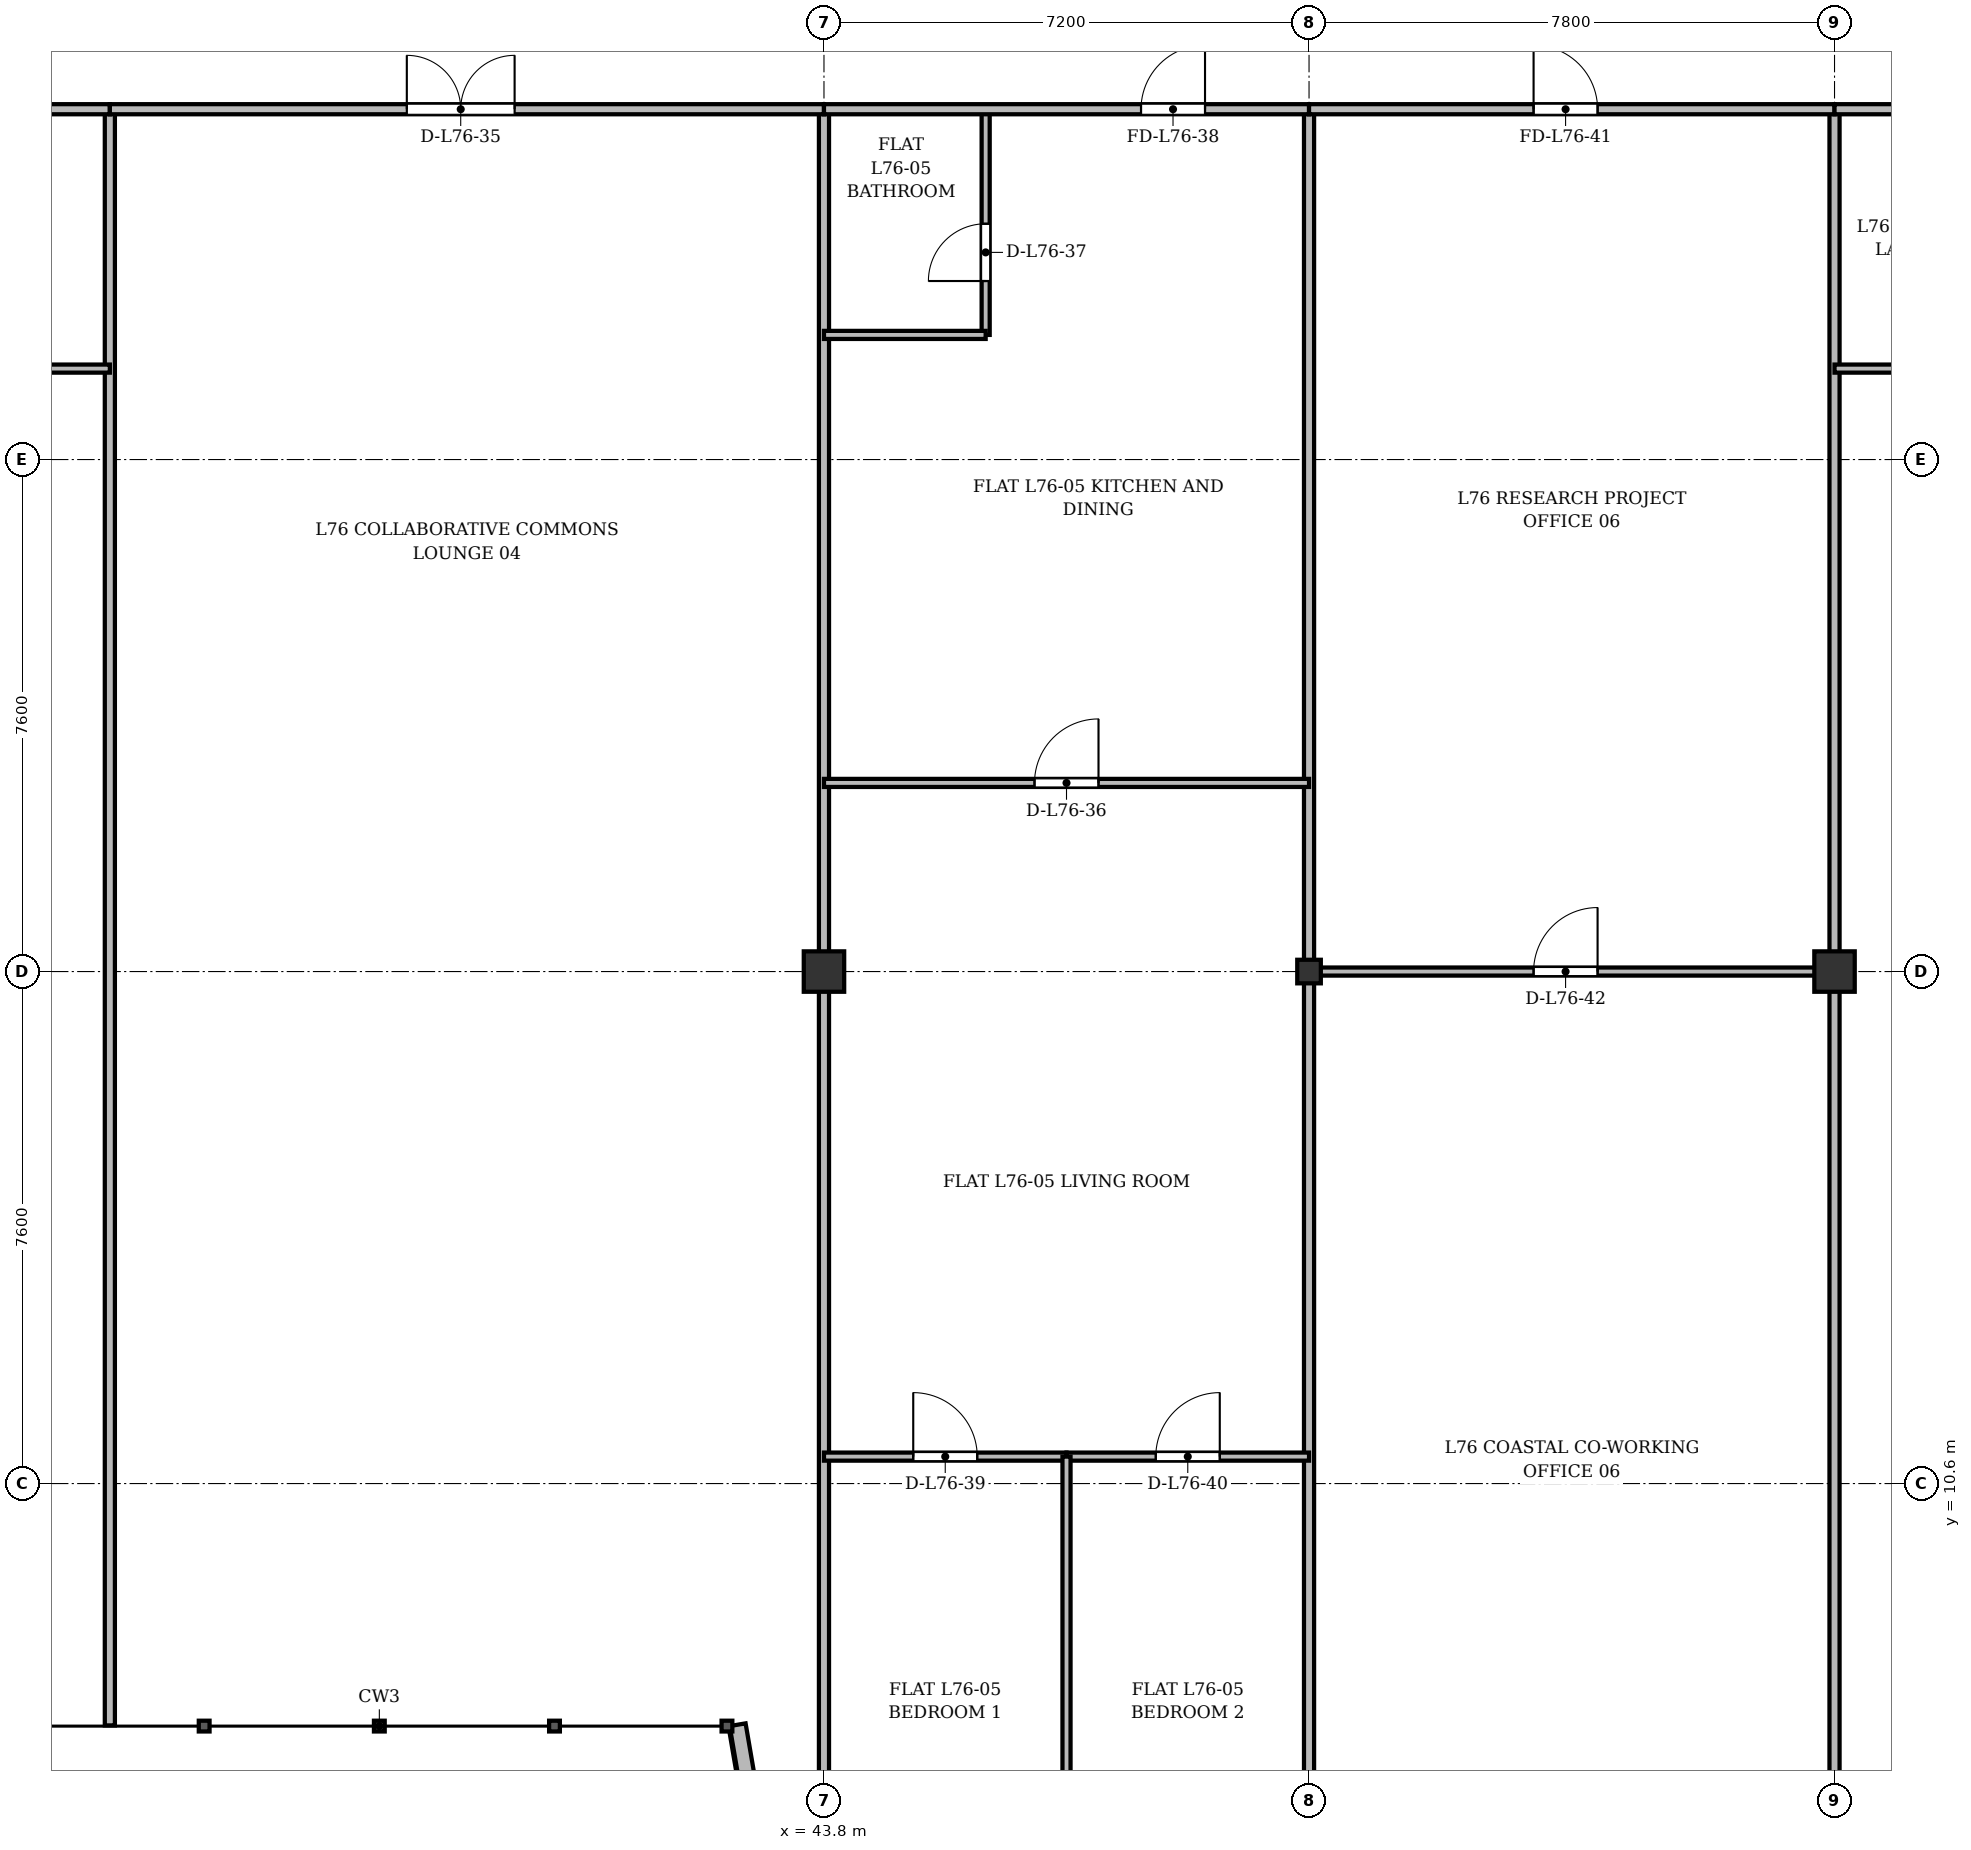
"""IFC4 building model, lengths in metres.
Left out: names, types, materials, properties, quantities, classifications, styles, units other than length and angle.
Written with IfcOpenShell. Run it as: python <this file> out.ifc"""

import sys

from ifc_helpers import new_model, si_unit, direction, frame, frame_2d, origin, origin_2d, place, context, subcontext, project, spatial, rectangle, i_section, extrude, source, transform, mapped, element, fill, save


model = new_model("IFC4")
c1 = context("Model", 3, precision=1e-05, world=origin(), true_north=direction((0.0, 1.0)))
c2 = subcontext(c1, "Body", "Model", "MODEL_VIEW")
j1 = project(units=[si_unit("LENGTHUNIT", "METRE"), si_unit("PLANEANGLEUNIT", "RADIAN")], contexts=[c1])
p1 = place(None, origin())
s1 = spatial("IfcSite", under=j1, at=p1, CompositionType="ELEMENT")
p2 = place(p1, origin())
s2 = spatial("IfcBuilding", under=s1, at=p2, CompositionType="ELEMENT")
p3 = place(p2, frame((0.0, 0.0, 291.9)))
s3 = spatial("IfcBuildingStorey", under=s2, at=p3, CompositionType="ELEMENT", Elevation=291.9)
m1 = source(origin(), c2, "Body", "SweptSolid", [
    extrude(rectangle(XDim=0.6, YDim=0.6, at=origin_2d()), origin(), (0.0, 0.0, 1.0), 3.6),
])
p4 = place(p3, frame((43.8, 18.2, 0.0), z_axis=(0.0, 0.0, 1.0), x_axis=(1.0, 0.0, 0.0)))
e1 = element("IfcColumn", 1, at=p4, inside=s3, PredefinedType="COLUMN", context=c2, shape_type="MappedRepresentation", body=[
    mapped(m1, transform((0.0, 0.0, 0.0), x_axis=(1.0, 0.0, 0.0), y_axis=(0.0, 1.0, 0.0), z_axis=(0.0, 0.0, 1.0), scale=1.0)),
])
m2 = source(origin(), c2, "Body", "SweptSolid", [
    extrude(i_section(OverallWidth=0.35, OverallDepth=0.35, WebThickness=0.018, FlangeThickness=0.028, at=origin_2d()), origin(), (0.0, 0.0, 1.0), 3.6),
])
p5 = place(p3, frame((51.0, 18.2, 0.0), z_axis=(0.0, 0.0, 1.0), x_axis=(1.0, 0.0, 0.0)))
e2 = element("IfcColumn", 2, at=p5, inside=s3, PredefinedType="COLUMN", context=c2, shape_type="MappedRepresentation", body=[
    mapped(m2, transform((0.0, 0.0, 0.0), x_axis=(1.0, 0.0, 0.0), y_axis=(0.0, 1.0, 0.0), z_axis=(0.0, 0.0, 1.0), scale=1.0)),
])
p6 = place(p3, frame((58.8, 18.2, 0.0), z_axis=(0.0, 0.0, 1.0), x_axis=(1.0, 0.0, 0.0)))
e3 = element("IfcColumn", 3, at=p6, inside=s3, PredefinedType="COLUMN", context=c2, shape_type="MappedRepresentation", body=[
    mapped(m1, transform((0.0, 0.0, 0.0), x_axis=(1.0, 0.0, 0.0), y_axis=(0.0, 1.0, 0.0), z_axis=(0.0, 0.0, 1.0), scale=1.0)),
])
p7 = place(p3, frame((43.118, 3.52, 0.0), z_axis=(0.0, 0.0, 1.0), x_axis=(-0.168990530437, 0.98561767467, 0.0)))
e4 = element("IfcWall", 4, at=p7, inside=s3, PredefinedType="SOLIDWALL", context=c2, shape_type="SweptSolid", body=[
    extrude(rectangle(XDim=3.551, YDim=0.24, at=frame_2d((1.775, 0.0))), origin(), (0.0, 0.0, 1.0), 2.73),
])
p8 = place(p3, frame((33.2, 7.01, 0.0), z_axis=(0.0, 0.0, 1.0), x_axis=(0.0, 1.0, 0.0)))
e5 = element("IfcWall", 5, at=p8, inside=s3, PredefinedType="PARTITIONING", context=c2, shape_type="SweptSolid", body=[
    extrude(rectangle(XDim=23.99, YDim=0.15, at=frame_2d((11.995, 0.0))), origin(), (0.0, 0.0, 1.0), 2.73),
])
for number, where, z_axis, x_axis in (
    (6, (43.8, 3.725, 0.0), (0.0, 0.0, 1.0), (0.0, 1.0, 0.0)),
    (7, (51.0, 3.725, 0.0), (0.0, 0.0, 1.0), (0.0, 1.0, 0.0)),
):
    element("IfcWall", number, at=place(p3, frame(where, z_axis=z_axis, x_axis=x_axis)), inside=s3, PredefinedType="PARTITIONING", context=c2, shape_type="SweptSolid", body=[
        extrude(rectangle(XDim=27.275, YDim=0.15, at=frame_2d((13.637, 0.0))), origin(), (0.0, 0.0, 1.0), 2.68),
    ])
p9 = place(p3, frame((58.8, 3.725, 0.0), z_axis=(0.0, 0.0, 1.0), x_axis=(0.0, 1.0, 0.0)))
e8 = element("IfcWall", 8, at=p9, inside=s3, PredefinedType="PARTITIONING", context=c2, shape_type="SweptSolid", body=[
    extrude(rectangle(XDim=27.275, YDim=0.15, at=frame_2d((13.637, 0.0))), origin(), (0.0, 0.0, 1.0), 2.53),
])
p10 = place(p3, frame((23.4, 31.0, 0.0), z_axis=(0.0, 0.0, 1.0), x_axis=(1.0, 0.0, 0.0)))
e9 = element("IfcWall", 9, at=p10, inside=s3, PredefinedType="PARTITIONING", context=c2, shape_type="SweptSolid", body=[
    extrude(rectangle(XDim=9.8, YDim=0.15, at=frame_2d((4.9, 0.0))), origin(), (0.0, 0.0, 1.0), 2.68),
])
p11 = place(p10, frame((4.425, 0.0, 0.0)))
e10 = element("IfcOpeningElement", 10, at=p11, cuts=e9, PredefinedType="OPENING", context=c2, shape_type="SweptSolid", body=[
    extrude(rectangle(XDim=0.95, YDim=2.15, at=frame_2d((0.475, 1.075))), frame((0.0, 0.085, 0.0), z_axis=(0.0, -1.0, 0.0), x_axis=(1.0, 0.0, 0.0)), (0.0, 0.0, 1.0), 0.17),
])
p12 = place(p3, frame((23.4, 27.15, 0.0), z_axis=(0.0, 0.0, 1.0), x_axis=(1.0, 0.0, 0.0)))
e11 = element("IfcWall", 11, at=p12, inside=s3, PredefinedType="PARTITIONING", context=c2, shape_type="SweptSolid", body=[
    extrude(rectangle(XDim=9.8, YDim=0.12, at=frame_2d((4.9, 0.0))), origin(), (0.0, 0.0, 1.0), 2.68),
])
p13 = place(p12, frame((4.425, 0.0, 0.0)))
e12 = element("IfcOpeningElement", 12, at=p13, cuts=e11, PredefinedType="OPENING", context=c2, shape_type="SweptSolid", body=[
    extrude(rectangle(XDim=0.95, YDim=2.15, at=frame_2d((0.475, 1.075))), frame((0.0, 0.07, 0.0), z_axis=(0.0, -1.0, 0.0), x_axis=(1.0, 0.0, 0.0)), (0.0, 0.0, 1.0), 0.14),
])
p14 = place(p3, frame((33.2, 31.0, 0.0), z_axis=(0.0, 0.0, 1.0), x_axis=(1.0, 0.0, 0.0)))
e13 = element("IfcWall", 13, at=p14, inside=s3, PredefinedType="PARTITIONING", context=c2, shape_type="SweptSolid", body=[
    extrude(rectangle(XDim=10.6, YDim=0.15, at=frame_2d((5.3, 0.0))), origin(), (0.0, 0.0, 1.0), 2.68),
])
p15 = place(p14, frame((4.408, 0.0, 0.0)))
e14 = element("IfcOpeningElement", 14, at=p15, cuts=e13, PredefinedType="OPENING", context=c2, shape_type="SweptSolid", body=[
    extrude(rectangle(XDim=1.6, YDim=2.2, at=frame_2d((0.8, 1.1))), frame((0.0, 0.085, 0.0), z_axis=(0.0, -1.0, 0.0), x_axis=(1.0, 0.0, 0.0)), (0.0, 0.0, 1.0), 0.17),
])
p16 = place(p3, frame((43.8, 21.0, 0.0), z_axis=(0.0, 0.0, 1.0), x_axis=(1.0, 0.0, 0.0)))
e15 = element("IfcWall", 15, at=p16, inside=s3, PredefinedType="PARTITIONING", context=c2, shape_type="SweptSolid", body=[
    extrude(rectangle(XDim=7.2, YDim=0.12, at=frame_2d((3.6, 0.0))), origin(), (0.0, 0.0, 1.0), 2.68),
])
p17 = place(p16, frame((3.125, 0.0, 0.0)))
e16 = element("IfcOpeningElement", 16, at=p17, cuts=e15, PredefinedType="OPENING", context=c2, shape_type="SweptSolid", body=[
    extrude(rectangle(XDim=0.95, YDim=2.15, at=frame_2d((0.475, 1.075))), frame((0.0, 0.07, 0.0), z_axis=(0.0, -1.0, 0.0), x_axis=(1.0, 0.0, 0.0)), (0.0, 0.0, 1.0), 0.14),
])
p18 = place(p3, frame((46.2, 27.65, 0.0), z_axis=(0.0, 0.0, 1.0), x_axis=(0.0, 1.0, 0.0)))
e17 = element("IfcWall", 17, at=p18, inside=s3, PredefinedType="PARTITIONING", context=c2, shape_type="SweptSolid", body=[
    extrude(rectangle(XDim=3.35, YDim=0.12, at=frame_2d((1.675, 0.0))), origin(), (0.0, 0.0, 1.0), 3.18),
])
p19 = place(p18, frame((0.8, 0.0, 0.0)))
e18 = element("IfcOpeningElement", 18, at=p19, cuts=e17, PredefinedType="OPENING", context=c2, shape_type="SweptSolid", body=[
    extrude(rectangle(XDim=0.85, YDim=2.1, at=frame_2d((0.425, 1.05))), frame((0.0, 0.07, 0.0), z_axis=(0.0, -1.0, 0.0), x_axis=(1.0, 0.0, 0.0)), (0.0, 0.0, 1.0), 0.14),
])
p20 = place(p3, frame((43.8, 27.65, 0.0), z_axis=(0.0, 0.0, 1.0), x_axis=(1.0, 0.0, 0.0)))
e19 = element("IfcWall", 19, at=p20, inside=s3, PredefinedType="PARTITIONING", context=c2, shape_type="SweptSolid", body=[
    extrude(rectangle(XDim=2.4, YDim=0.12, at=frame_2d((1.2, 0.0))), origin(), (0.0, 0.0, 1.0), 2.68),
])
p21 = place(p3, frame((43.8, 31.0, 0.0), z_axis=(0.0, 0.0, 1.0), x_axis=(1.0, 0.0, 0.0)))
e20 = element("IfcWall", 20, at=p21, inside=s3, PredefinedType="PARTITIONING", context=c2, shape_type="SweptSolid", body=[
    extrude(rectangle(XDim=7.2, YDim=0.15, at=frame_2d((3.6, 0.0))), origin(), (0.0, 0.0, 1.0), 2.68),
])
p22 = place(p21, frame((4.706, 0.0, 0.0)))
e21 = element("IfcOpeningElement", 21, at=p22, cuts=e20, PredefinedType="OPENING", context=c2, shape_type="SweptSolid", body=[
    extrude(rectangle(XDim=0.95, YDim=2.15, at=frame_2d((0.475, 1.075))), frame((0.0, 0.085, 0.0), z_axis=(0.0, -1.0, 0.0), x_axis=(1.0, 0.0, 0.0)), (0.0, 0.0, 1.0), 0.17),
])
p23 = place(p3, frame((43.8, 11.0, 0.0), z_axis=(0.0, 0.0, 1.0), x_axis=(1.0, 0.0, 0.0)))
e22 = element("IfcWall", 22, at=p23, inside=s3, PredefinedType="PARTITIONING", context=c2, shape_type="SweptSolid", body=[
    extrude(rectangle(XDim=3.6, YDim=0.12, at=frame_2d((1.8, 0.0))), origin(), (0.0, 0.0, 1.0), 2.68),
])
p24 = place(p23, frame((1.325, 0.0, 0.0)))
e23 = element("IfcOpeningElement", 23, at=p24, cuts=e22, PredefinedType="OPENING", context=c2, shape_type="SweptSolid", body=[
    extrude(rectangle(XDim=0.95, YDim=2.15, at=frame_2d((0.475, 1.075))), frame((0.0, 0.07, 0.0), z_axis=(0.0, -1.0, 0.0), x_axis=(1.0, 0.0, 0.0)), (0.0, 0.0, 1.0), 0.14),
])
p25 = place(p3, frame((47.4, 11.0, 0.0), z_axis=(0.0, 0.0, 1.0), x_axis=(1.0, 0.0, 0.0)))
e24 = element("IfcWall", 24, at=p25, inside=s3, PredefinedType="PARTITIONING", context=c2, shape_type="SweptSolid", body=[
    extrude(rectangle(XDim=3.6, YDim=0.12, at=frame_2d((1.8, 0.0))), origin(), (0.0, 0.0, 1.0), 2.68),
])
p26 = place(p25, frame((1.325, 0.0, 0.0)))
e25 = element("IfcOpeningElement", 25, at=p26, cuts=e24, PredefinedType="OPENING", context=c2, shape_type="SweptSolid", body=[
    extrude(rectangle(XDim=0.95, YDim=2.15, at=frame_2d((0.475, 1.075))), frame((0.0, 0.07, 0.0), z_axis=(0.0, -1.0, 0.0), x_axis=(1.0, 0.0, 0.0)), (0.0, 0.0, 1.0), 0.14),
])
p27 = place(p3, frame((47.4, 3.725, 0.0), z_axis=(0.0, 0.0, 1.0), x_axis=(0.0, 1.0, 0.0)))
e26 = element("IfcWall", 26, at=p27, inside=s3, PredefinedType="PARTITIONING", context=c2, shape_type="SweptSolid", body=[
    extrude(rectangle(XDim=7.275, YDim=0.12, at=frame_2d((3.637, 0.0))), origin(), (0.0, 0.0, 1.0), 2.73),
])
p28 = place(p3, frame((51.0, 31.0, 0.0), z_axis=(0.0, 0.0, 1.0), x_axis=(1.0, 0.0, 0.0)))
e27 = element("IfcWall", 27, at=p28, inside=s3, PredefinedType="PARTITIONING", context=c2, shape_type="SweptSolid", body=[
    extrude(rectangle(XDim=7.8, YDim=0.15, at=frame_2d((3.9, 0.0))), origin(), (0.0, 0.0, 1.0), 2.68),
])
p29 = place(p28, frame((3.333, 0.0, 0.0)))
e28 = element("IfcOpeningElement", 28, at=p29, cuts=e27, PredefinedType="OPENING", context=c2, shape_type="SweptSolid", body=[
    extrude(rectangle(XDim=0.95, YDim=2.15, at=frame_2d((0.475, 1.075))), frame((0.0, 0.085, 0.0), z_axis=(0.0, -1.0, 0.0), x_axis=(1.0, 0.0, 0.0)), (0.0, 0.0, 1.0), 0.17),
])
p30 = place(p3, frame((51.0, 18.2, 0.0), z_axis=(0.0, 0.0, 1.0), x_axis=(1.0, 0.0, 0.0)))
e29 = element("IfcWall", 29, at=p30, inside=s3, PredefinedType="PARTITIONING", context=c2, shape_type="SweptSolid", body=[
    extrude(rectangle(XDim=7.8, YDim=0.12, at=frame_2d((3.9, 0.0))), origin(), (0.0, 0.0, 1.0), 2.73),
])
p31 = place(p30, frame((3.333, 0.0, 0.0)))
e30 = element("IfcOpeningElement", 30, at=p31, cuts=e29, PredefinedType="OPENING", context=c2, shape_type="SweptSolid", body=[
    extrude(rectangle(XDim=0.95, YDim=2.15, at=frame_2d((0.475, 1.075))), frame((0.0, 0.07, 0.0), z_axis=(0.0, -1.0, 0.0), x_axis=(1.0, 0.0, 0.0)), (0.0, 0.0, 1.0), 0.14),
])
p32 = place(p3, frame((58.8, 31.0, 0.0), z_axis=(0.0, 0.0, 1.0), x_axis=(1.0, 0.0, 0.0)))
e31 = element("IfcWall", 31, at=p32, inside=s3, PredefinedType="PARTITIONING", context=c2, shape_type="SweptSolid", body=[
    extrude(rectangle(XDim=7.175, YDim=0.15, at=frame_2d((3.587, 0.0))), origin(), (0.0, 0.0, 1.0), 2.53),
])
p33 = place(p32, frame((3.112, 0.0, 0.0)))
e32 = element("IfcOpeningElement", 32, at=p33, cuts=e31, PredefinedType="OPENING", context=c2, shape_type="SweptSolid", body=[
    extrude(rectangle(XDim=0.95, YDim=2.15, at=frame_2d((0.475, 1.075))), frame((0.0, 0.085, 0.0), z_axis=(0.0, -1.0, 0.0), x_axis=(1.0, 0.0, 0.0)), (0.0, 0.0, 1.0), 0.17),
])
p34 = place(p3, frame((58.8, 27.15, 0.0), z_axis=(0.0, 0.0, 1.0), x_axis=(1.0, 0.0, 0.0)))
e33 = element("IfcWall", 33, at=p34, inside=s3, PredefinedType="PARTITIONING", context=c2, shape_type="SweptSolid", body=[
    extrude(rectangle(XDim=7.175, YDim=0.12, at=frame_2d((3.587, 0.0))), origin(), (0.0, 0.0, 1.0), 2.53),
])
p35 = place(p34, frame((3.112, 0.0, 0.0)))
e34 = element("IfcOpeningElement", 34, at=p35, cuts=e33, PredefinedType="OPENING", context=c2, shape_type="SweptSolid", body=[
    extrude(rectangle(XDim=0.95, YDim=2.15, at=frame_2d((0.475, 1.075))), frame((0.0, 0.07, 0.0), z_axis=(0.0, -1.0, 0.0), x_axis=(1.0, 0.0, 0.0)), (0.0, 0.0, 1.0), 0.14),
])
m3 = source(origin(), c2, "Body", "SweptSolid", [
    extrude(rectangle(XDim=1.6, YDim=2.2, at=frame_2d((0.8, 1.1))), frame((0.0, 0.025, 0.0), z_axis=(0.0, -1.0, 0.0), x_axis=(1.0, 0.0, 0.0)), (0.0, 0.0, 1.0), 0.05),
])
p36 = place(p15, origin())
e35 = element("IfcDoor", 35, at=p36, inside=s3, OperationType="DOUBLE_DOOR_SINGLE_SWING", PredefinedType="DOOR", context=c2, shape_type="MappedRepresentation", body=[
    mapped(m3, transform((0.0, 0.0, 0.0), x_axis=(1.0, 0.0, 0.0), y_axis=(0.0, 1.0, 0.0), z_axis=(0.0, 0.0, 1.0), scale=1.0)),
])
fill(e14, e35)
m4 = source(origin(), c2, "Body", "SweptSolid", [
    extrude(rectangle(XDim=0.95, YDim=2.15, at=frame_2d((0.475, 1.075))), frame((0.0, 0.025, 0.0), z_axis=(0.0, -1.0, 0.0), x_axis=(1.0, 0.0, 0.0)), (0.0, 0.0, 1.0), 0.05),
])
p37 = place(p17, origin())
e36 = element("IfcDoor", 36, at=p37, inside=s3, OperationType="SINGLE_SWING_RIGHT", PredefinedType="DOOR", context=c2, shape_type="MappedRepresentation", body=[
    mapped(m4, transform((0.0, 0.0, 0.0), x_axis=(1.0, 0.0, 0.0), y_axis=(0.0, 1.0, 0.0), z_axis=(0.0, 0.0, 1.0), scale=1.0)),
])
fill(e16, e36)
m5 = source(origin(), c2, "Body", "SweptSolid", [
    extrude(rectangle(XDim=0.85, YDim=2.1, at=frame_2d((0.425, 1.05))), frame((0.0, 0.025, 0.0), z_axis=(0.0, -1.0, 0.0), x_axis=(1.0, 0.0, 0.0)), (0.0, 0.0, 1.0), 0.05),
])
p38 = place(p19, origin())
e37 = element("IfcDoor", 37, at=p38, inside=s3, OperationType="SINGLE_SWING_LEFT", PredefinedType="DOOR", context=c2, shape_type="MappedRepresentation", body=[
    mapped(m5, transform((0.0, 0.0, 0.0), x_axis=(1.0, 0.0, 0.0), y_axis=(0.0, 1.0, 0.0), z_axis=(0.0, 0.0, 1.0), scale=1.0)),
])
fill(e18, e37)
p39 = place(p22, origin())
e38 = element("IfcDoor", 38, at=p39, inside=s3, OperationType="SINGLE_SWING_RIGHT", PredefinedType="DOOR", context=c2, shape_type="MappedRepresentation", body=[
    mapped(m4, transform((0.0, 0.0, 0.0), x_axis=(1.0, 0.0, 0.0), y_axis=(0.0, 1.0, 0.0), z_axis=(0.0, 0.0, 1.0), scale=1.0)),
])
fill(e21, e38)
p40 = place(p24, origin())
e39 = element("IfcDoor", 39, at=p40, inside=s3, OperationType="SINGLE_SWING_LEFT", PredefinedType="DOOR", context=c2, shape_type="MappedRepresentation", body=[
    mapped(m4, transform((0.0, 0.0, 0.0), x_axis=(1.0, 0.0, 0.0), y_axis=(0.0, 1.0, 0.0), z_axis=(0.0, 0.0, 1.0), scale=1.0)),
])
fill(e23, e39)
p41 = place(p26, origin())
e40 = element("IfcDoor", 40, at=p41, inside=s3, OperationType="SINGLE_SWING_RIGHT", PredefinedType="DOOR", context=c2, shape_type="MappedRepresentation", body=[
    mapped(m4, transform((0.0, 0.0, 0.0), x_axis=(1.0, 0.0, 0.0), y_axis=(0.0, 1.0, 0.0), z_axis=(0.0, 0.0, 1.0), scale=1.0)),
])
fill(e25, e40)
p42 = place(p29, origin())
e41 = element("IfcDoor", 41, at=p42, inside=s3, OperationType="SINGLE_SWING_LEFT", PredefinedType="DOOR", context=c2, shape_type="MappedRepresentation", body=[
    mapped(m4, transform((0.0, 0.0, 0.0), x_axis=(1.0, 0.0, 0.0), y_axis=(0.0, 1.0, 0.0), z_axis=(0.0, 0.0, 1.0), scale=1.0)),
])
fill(e28, e41)
p43 = place(p31, origin())
e42 = element("IfcDoor", 42, at=p43, inside=s3, OperationType="SINGLE_SWING_RIGHT", PredefinedType="DOOR", context=c2, shape_type="MappedRepresentation", body=[
    mapped(m4, transform((0.0, 0.0, 0.0), x_axis=(1.0, 0.0, 0.0), y_axis=(0.0, 1.0, 0.0), z_axis=(0.0, 0.0, 1.0), scale=1.0)),
])
fill(e30, e42)
save(model, sys.argv[1])
